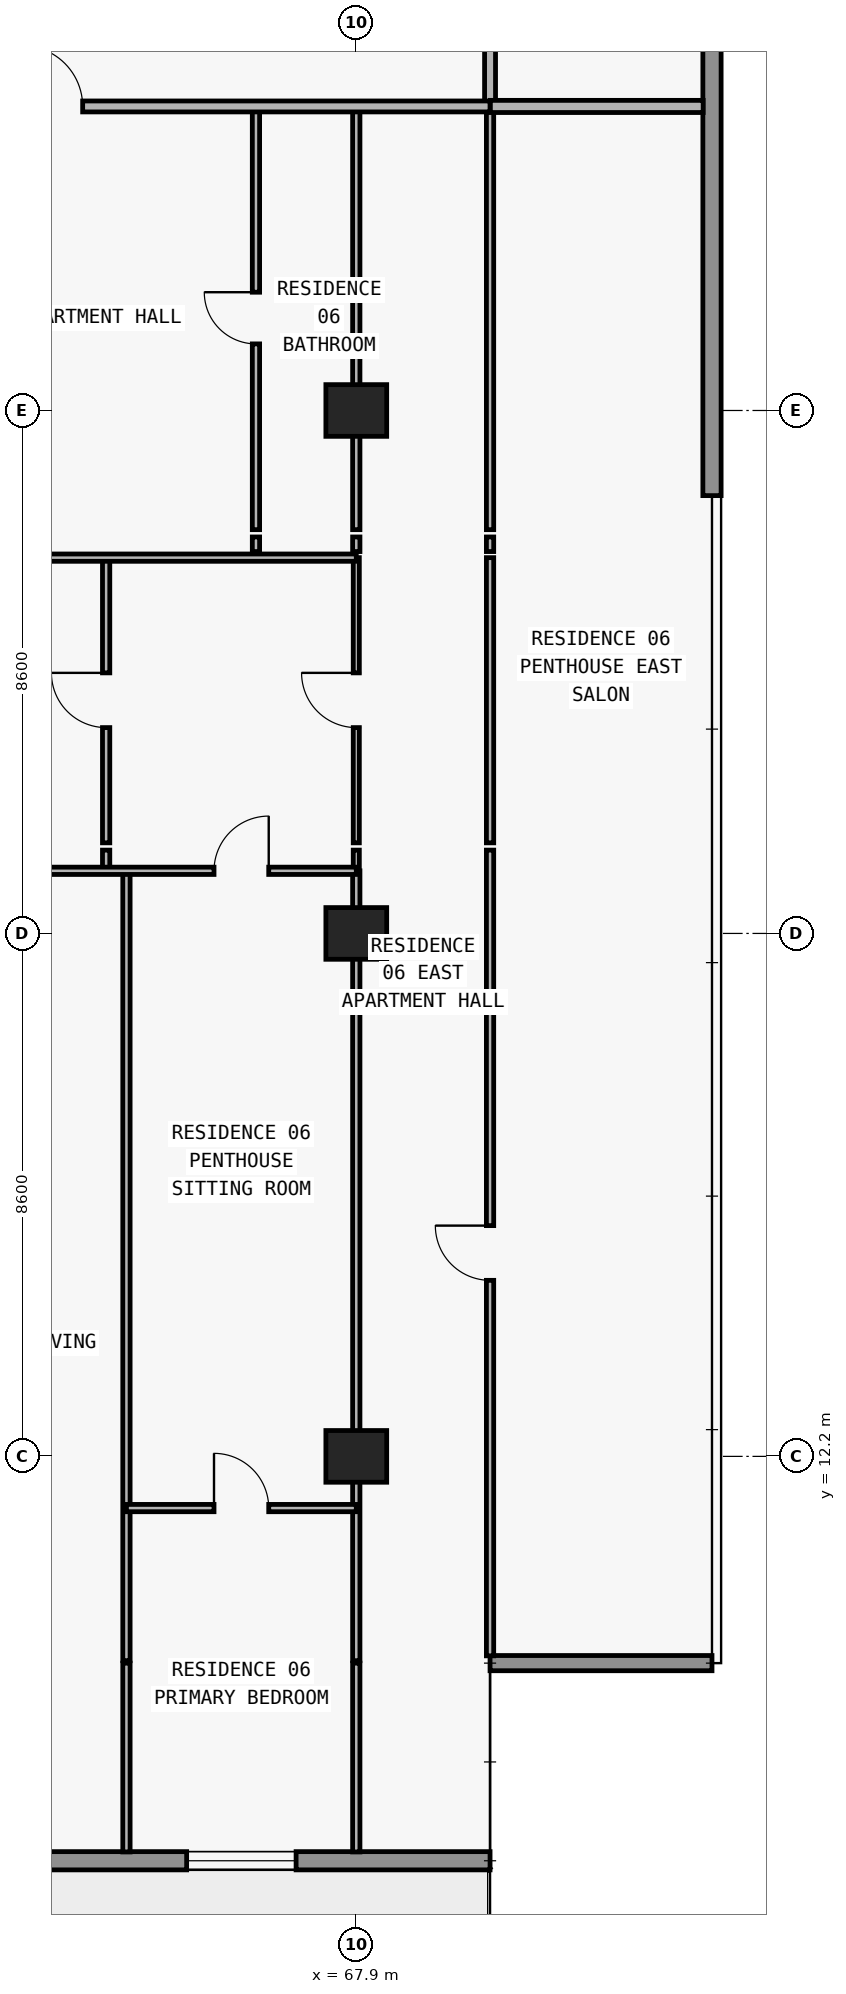
"""IFC4 building model, lengths in metres.
Left out: names, types, materials, properties, quantities, classifications, styles, units other than length and angle.
Written with IfcOpenShell. Run it as: python <this file> out.ifc"""

import sys

from ifc_helpers import new_model, si_unit, direction, frame, frame_2d, origin, origin_2d, place, context, subcontext, project, spatial, rectangle, extrude, element, fill, save


model = new_model("IFC4")
c1 = context("Model", 3, precision=1e-05, world=origin(), true_north=direction((0.0, 1.0)))
c2 = subcontext(c1, "Body", "Model", "MODEL_VIEW")
j1 = project(units=[si_unit("LENGTHUNIT", "METRE"), si_unit("PLANEANGLEUNIT", "RADIAN")], contexts=[c1])
p1 = place(None, origin())
s1 = spatial("IfcSite", under=j1, at=p1, CompositionType="ELEMENT")
p2 = place(p1, origin())
s2 = spatial("IfcBuilding", under=s1, at=p2, CompositionType="ELEMENT")
p3 = place(p2, frame((0.0, 0.0, 87.9)))
s3 = spatial("IfcBuildingStorey", under=s2, at=p3, CompositionType="ELEMENT", Elevation=87.9)
for number, where, z_axis, x_axis in (
    (1, (67.9, 12.2, 0.0), (0.0, 0.0, 1.0), (1.0, 0.0, 0.0)),
    (2, (67.9, 20.8, 0.0), (0.0, 0.0, 1.0), (1.0, 0.0, 0.0)),
    (3, (67.9, 29.4, 0.0), (0.0, 0.0, 1.0), (1.0, 0.0, 0.0)),
):
    element("IfcColumn", number, at=place(p3, frame(where, z_axis=z_axis, x_axis=x_axis)), inside=s3, PredefinedType="COLUMN", context=c2, shape_type="SweptSolid", body=[
        extrude(rectangle(XDim=1.0, YDim=0.85, at=origin_2d()), origin(), (0.0, 0.0, 1.0), 3.05),
    ])
p4 = place(p3, frame((70.1, 5.55, 0.0), z_axis=(0.0, 0.0, 1.0), x_axis=(-1.0, 0.0, 0.0)))
e4 = element("IfcWall", 4, at=p4, inside=s3, PredefinedType="STANDARD", context=c2, shape_type="SweptSolid", body=[
    extrude(rectangle(XDim=62.4, YDim=0.3, at=frame_2d((31.2, 0.0))), origin(), (0.0, 0.0, 1.0), 3.05),
])
p5 = place(p4, frame((57.226, 0.0, 0.0)))
e5 = element("IfcOpeningElement", 5, at=p5, cuts=e4, PredefinedType="OPENING", context=c2, shape_type="SweptSolid", body=[
    extrude(rectangle(XDim=2.0, YDim=2.3, at=frame_2d((1.0, 1.15))), frame((0.0, 0.16, 0.0), z_axis=(0.0, -1.0, 0.0), x_axis=(1.0, 0.0, 0.0)), (0.0, 0.0, 1.0), 0.32),
])
p6 = place(p4, frame((52.926, 0.0, 0.85)))
e6 = element("IfcOpeningElement", 6, at=p6, cuts=e4, PredefinedType="OPENING", context=c2, shape_type="SweptSolid", body=[
    extrude(rectangle(XDim=2.2, YDim=1.55, at=frame_2d((1.1, 0.775))), frame((0.0, 0.16, 0.0), z_axis=(0.0, -1.0, 0.0), x_axis=(1.0, 0.0, 0.0)), (0.0, 0.0, 1.0), 0.32),
])
p7 = place(p4, frame((48.49, 0.0, 0.0)))
e7 = element("IfcOpeningElement", 7, at=p7, cuts=e4, PredefinedType="OPENING", context=c2, shape_type="SweptSolid", body=[
    extrude(rectangle(XDim=2.0, YDim=2.3, at=frame_2d((1.0, 1.15))), frame((0.0, 0.16, 0.0), z_axis=(0.0, -1.0, 0.0), x_axis=(1.0, 0.0, 0.0)), (0.0, 0.0, 1.0), 0.32),
])
p8 = place(p4, frame((44.39, 0.0, 0.85)))
e8 = element("IfcOpeningElement", 8, at=p8, cuts=e4, PredefinedType="OPENING", context=c2, shape_type="SweptSolid", body=[
    extrude(rectangle(XDim=1.8, YDim=1.55, at=frame_2d((0.9, 0.775))), frame((0.0, 0.16, 0.0), z_axis=(0.0, -1.0, 0.0), x_axis=(1.0, 0.0, 0.0)), (0.0, 0.0, 1.0), 0.32),
])
p9 = place(p4, frame((40.426, 0.0, 0.0)))
e9 = element("IfcOpeningElement", 9, at=p9, cuts=e4, PredefinedType="OPENING", context=c2, shape_type="SweptSolid", body=[
    extrude(rectangle(XDim=2.0, YDim=2.3, at=frame_2d((1.0, 1.15))), frame((0.0, 0.16, 0.0), z_axis=(0.0, -1.0, 0.0), x_axis=(1.0, 0.0, 0.0)), (0.0, 0.0, 1.0), 0.32),
])
p10 = place(p4, frame((36.126, 0.0, 0.85)))
e10 = element("IfcOpeningElement", 10, at=p10, cuts=e4, PredefinedType="OPENING", context=c2, shape_type="SweptSolid", body=[
    extrude(rectangle(XDim=2.2, YDim=1.55, at=frame_2d((1.1, 0.775))), frame((0.0, 0.16, 0.0), z_axis=(0.0, -1.0, 0.0), x_axis=(1.0, 0.0, 0.0)), (0.0, 0.0, 1.0), 0.32),
])
p11 = place(p4, frame((32.09, 0.0, 0.0)))
e11 = element("IfcOpeningElement", 11, at=p11, cuts=e4, PredefinedType="OPENING", context=c2, shape_type="SweptSolid", body=[
    extrude(rectangle(XDim=2.0, YDim=2.3, at=frame_2d((1.0, 1.15))), frame((0.0, 0.16, 0.0), z_axis=(0.0, -1.0, 0.0), x_axis=(1.0, 0.0, 0.0)), (0.0, 0.0, 1.0), 0.32),
])
p12 = place(p4, frame((28.21, 0.0, 0.65)))
e12 = element("IfcOpeningElement", 12, at=p12, cuts=e4, PredefinedType="OPENING", context=c2, shape_type="SweptSolid", body=[
    extrude(rectangle(XDim=2.6, YDim=1.85, at=frame_2d((1.3, 0.925))), frame((0.0, 0.16, 0.0), z_axis=(0.0, -1.0, 0.0), x_axis=(1.0, 0.0, 0.0)), (0.0, 0.0, 1.0), 0.32),
])
p13 = place(p4, frame((22.1, 0.0, 0.85)))
e13 = element("IfcOpeningElement", 13, at=p13, cuts=e4, PredefinedType="OPENING", context=c2, shape_type="SweptSolid", body=[
    extrude(rectangle(XDim=2.2, YDim=1.55, at=frame_2d((1.1, 0.775))), frame((0.0, 0.16, 0.0), z_axis=(0.0, -1.0, 0.0), x_axis=(1.0, 0.0, 0.0)), (0.0, 0.0, 1.0), 0.32),
])
p14 = place(p4, frame((16.026, 0.0, 0.0)))
e14 = element("IfcOpeningElement", 14, at=p14, cuts=e4, PredefinedType="OPENING", context=c2, shape_type="SweptSolid", body=[
    extrude(rectangle(XDim=2.0, YDim=2.3, at=frame_2d((1.0, 1.15))), frame((0.0, 0.16, 0.0), z_axis=(0.0, -1.0, 0.0), x_axis=(1.0, 0.0, 0.0)), (0.0, 0.0, 1.0), 0.32),
])
p15 = place(p4, frame((11.726, 0.0, 0.85)))
e15 = element("IfcOpeningElement", 15, at=p15, cuts=e4, PredefinedType="OPENING", context=c2, shape_type="SweptSolid", body=[
    extrude(rectangle(XDim=2.2, YDim=1.55, at=frame_2d((1.1, 0.775))), frame((0.0, 0.16, 0.0), z_axis=(0.0, -1.0, 0.0), x_axis=(1.0, 0.0, 0.0)), (0.0, 0.0, 1.0), 0.32),
])
p16 = place(p4, frame((7.29, 0.0, 0.0)))
e16 = element("IfcOpeningElement", 16, at=p16, cuts=e4, PredefinedType="OPENING", context=c2, shape_type="SweptSolid", body=[
    extrude(rectangle(XDim=2.0, YDim=2.3, at=frame_2d((1.0, 1.15))), frame((0.0, 0.16, 0.0), z_axis=(0.0, -1.0, 0.0), x_axis=(1.0, 0.0, 0.0)), (0.0, 0.0, 1.0), 0.32),
])
p17 = place(p4, frame((3.19, 0.0, 0.85)))
e17 = element("IfcOpeningElement", 17, at=p17, cuts=e4, PredefinedType="OPENING", context=c2, shape_type="SweptSolid", body=[
    extrude(rectangle(XDim=1.8, YDim=1.55, at=frame_2d((0.9, 0.775))), frame((0.0, 0.16, 0.0), z_axis=(0.0, -1.0, 0.0), x_axis=(1.0, 0.0, 0.0)), (0.0, 0.0, 1.0), 0.32),
])
p18 = place(p3, frame((70.1, 8.8, 0.0), z_axis=(0.0, 0.0, 1.0), x_axis=(1.0, 0.0, 0.0)))
e18 = element("IfcWall", 18, at=p18, inside=s3, PredefinedType="ELEMENTEDWALL", context=c2, shape_type="SweptSolid", body=[
    extrude(rectangle(XDim=3.65, YDim=0.25, at=frame_2d((1.825, 0.0))), origin(), (0.0, 0.0, 1.0), 3.05),
])
p19 = place(p3, frame((73.75, 47.2, 0.0), z_axis=(0.0, 0.0, 1.0), x_axis=(0.0, -1.0, 0.0)))
e19 = element("IfcWall", 19, at=p19, inside=s3, PredefinedType="STANDARD", context=c2, shape_type="SweptSolid", body=[
    extrude(rectangle(XDim=19.2, YDim=0.3, at=frame_2d((9.6, 0.0))), origin(), (0.0, 0.0, 1.0), 3.05),
])
p20 = place(p3, frame((63.786, 21.83, 0.0), z_axis=(0.0, 0.0, 1.0), x_axis=(0.0, 1.0, 0.0)))
e20 = element("IfcWall", 20, at=p20, inside=s3, PredefinedType="PARTITIONING", context=c2, shape_type="SweptSolid", body=[
    extrude(rectangle(XDim=0.34, YDim=0.12, at=frame_2d((0.17, 0.0))), origin(), (0.0, 0.0, 1.0), 3.05),
])
p21 = place(p3, frame((63.786, 22.29, 0.0), z_axis=(0.0, 0.0, 1.0), x_axis=(0.0, 1.0, 0.0)))
e21 = element("IfcWall", 21, at=p21, inside=s3, PredefinedType="PARTITIONING", context=c2, shape_type="SweptSolid", body=[
    extrude(rectangle(XDim=4.69, YDim=0.12, at=frame_2d((2.345, 0.0))), origin(), (0.0, 0.0, 1.0), 3.05),
])
p22 = place(p21, frame((1.895, 0.0, 0.0)))
e22 = element("IfcOpeningElement", 22, at=p22, cuts=e21, PredefinedType="OPENING", context=c2, shape_type="SweptSolid", body=[
    extrude(rectangle(XDim=0.9, YDim=2.15, at=frame_2d((0.45, 1.075))), frame((0.0, 0.07, 0.0), z_axis=(0.0, -1.0, 0.0), x_axis=(1.0, 0.0, 0.0)), (0.0, 0.0, 1.0), 0.14),
])
p23 = place(p3, frame((64.12, 5.695, 0.0), z_axis=(0.0, 0.0, 1.0), x_axis=(0.0, 1.0, 0.0)))
e23 = element("IfcWall", 23, at=p23, inside=s3, PredefinedType="PARTITIONING", context=c2, shape_type="SweptSolid", body=[
    extrude(rectangle(XDim=3.105, YDim=0.12, at=frame_2d((1.552, 0.0))), origin(), (0.0, 0.0, 1.0), 3.05),
])
p24 = place(p3, frame((64.12, 8.84, 0.0), z_axis=(0.0, 0.0, 1.0), x_axis=(0.0, 1.0, 0.0)))
e24 = element("IfcWall", 24, at=p24, inside=s3, PredefinedType="PARTITIONING", context=c2, shape_type="SweptSolid", body=[
    extrude(rectangle(XDim=12.99, YDim=0.12, at=frame_2d((6.495, 0.0))), origin(), (0.0, 0.0, 1.0), 3.05),
])
p25 = place(p3, frame((66.25, 27.08, 0.0), z_axis=(0.0, 0.0, 1.0), x_axis=(0.0, 1.0, 0.0)))
e25 = element("IfcWall", 25, at=p25, inside=s3, PredefinedType="PARTITIONING", context=c2, shape_type="SweptSolid", body=[
    extrude(rectangle(XDim=0.24, YDim=0.12, at=frame_2d((0.12, 0.0))), origin(), (0.0, 0.0, 1.0), 3.05),
])
p26 = place(p3, frame((66.25, 27.44, 0.0), z_axis=(0.0, 0.0, 1.0), x_axis=(0.0, 1.0, 0.0)))
e26 = element("IfcWall", 26, at=p26, inside=s3, PredefinedType="PARTITIONING", context=c2, shape_type="SweptSolid", body=[
    extrude(rectangle(XDim=6.96, YDim=0.12, at=frame_2d((3.48, 0.0))), origin(), (0.0, 0.0, 1.0), 3.05),
])
p27 = place(p26, frame((3.055, 0.0, 0.0)))
e27 = element("IfcOpeningElement", 27, at=p27, cuts=e26, PredefinedType="OPENING", context=c2, shape_type="SweptSolid", body=[
    extrude(rectangle(XDim=0.85, YDim=2.1, at=frame_2d((0.425, 1.05))), frame((0.0, 0.07, 0.0), z_axis=(0.0, -1.0, 0.0), x_axis=(1.0, 0.0, 0.0)), (0.0, 0.0, 1.0), 0.14),
])
p28 = place(p3, frame((67.9, 5.695, 0.0), z_axis=(0.0, 0.0, 1.0), x_axis=(0.0, 1.0, 0.0)))
e28 = element("IfcWall", 28, at=p28, inside=s3, PredefinedType="PARTITIONING", context=c2, shape_type="SweptSolid", body=[
    extrude(rectangle(XDim=3.105, YDim=0.12, at=frame_2d((1.552, 0.0))), origin(), (0.0, 0.0, 1.0), 3.05),
])
p29 = place(p3, frame((67.9, 8.84, 0.0), z_axis=(0.0, 0.0, 1.0), x_axis=(0.0, 1.0, 0.0)))
e29 = element("IfcWall", 29, at=p29, inside=s3, PredefinedType="PARTITIONING", context=c2, shape_type="SweptSolid", body=[
    extrude(rectangle(XDim=12.99, YDim=0.12, at=frame_2d((6.495, 0.0))), origin(), (0.0, 0.0, 1.0), 2.174),
])
p30 = place(p3, frame((67.9, 21.835, 0.0), z_axis=(0.0, 0.0, 1.0), x_axis=(0.0, 1.0, 0.0)))
e30 = element("IfcWall", 30, at=p30, inside=s3, PredefinedType="MOVABLE", context=c2, shape_type="SweptSolid", body=[
    extrude(rectangle(XDim=0.335, YDim=0.1, at=frame_2d((0.167, 0.0))), origin(), (0.0, 0.0, 1.0), 2.174),
])
p31 = place(p3, frame((67.9, 22.29, 0.0), z_axis=(0.0, 0.0, 1.0), x_axis=(0.0, 1.0, 0.0)))
e31 = element("IfcWall", 31, at=p31, inside=s3, PredefinedType="MOVABLE", context=c2, shape_type="SweptSolid", body=[
    extrude(rectangle(XDim=4.69, YDim=0.1, at=frame_2d((2.345, 0.0))), origin(), (0.0, 0.0, 1.0), 2.174),
])
p32 = place(p31, frame((1.895, 0.0, 0.0)))
e32 = element("IfcOpeningElement", 32, at=p32, cuts=e31, PredefinedType="OPENING", context=c2, shape_type="SweptSolid", body=[
    extrude(rectangle(XDim=0.9, YDim=2.124, at=frame_2d((0.45, 1.062))), frame((0.0, 0.06, 0.0), z_axis=(0.0, -1.0, 0.0), x_axis=(1.0, 0.0, 0.0)), (0.0, 0.0, 1.0), 0.12),
])
p33 = place(p3, frame((67.9, 27.08, 0.0), z_axis=(0.0, 0.0, 1.0), x_axis=(0.0, 1.0, 0.0)))
e33 = element("IfcWall", 33, at=p33, inside=s3, PredefinedType="PARTITIONING", context=c2, shape_type="SweptSolid", body=[
    extrude(rectangle(XDim=0.24, YDim=0.12, at=frame_2d((0.12, 0.0))), origin(), (0.0, 0.0, 1.0), 2.174),
])
p34 = place(p3, frame((67.9, 27.44, 0.0), z_axis=(0.0, 0.0, 1.0), x_axis=(0.0, 1.0, 0.0)))
e34 = element("IfcWall", 34, at=p34, inside=s3, PredefinedType="PARTITIONING", context=c2, shape_type="SweptSolid", body=[
    extrude(rectangle(XDim=6.96, YDim=0.12, at=frame_2d((3.48, 0.0))), origin(), (0.0, 0.0, 1.0), 2.174),
])
p35 = place(p3, frame((70.1, 8.92, 0.0), z_axis=(0.0, 0.0, 1.0), x_axis=(0.0, 1.0, 0.0)))
e35 = element("IfcWall", 35, at=p35, inside=s3, PredefinedType="PARTITIONING", context=c2, shape_type="SweptSolid", body=[
    extrude(rectangle(XDim=13.25, YDim=0.12, at=frame_2d((6.625, 0.0))), origin(), (0.0, 0.0, 1.0), 3.05),
])
p36 = place(p35, frame((6.175, 0.0, 0.0)))
e36 = element("IfcOpeningElement", 36, at=p36, cuts=e35, PredefinedType="OPENING", context=c2, shape_type="SweptSolid", body=[
    extrude(rectangle(XDim=0.9, YDim=2.15, at=frame_2d((0.45, 1.075))), frame((0.0, 0.07, 0.0), z_axis=(0.0, -1.0, 0.0), x_axis=(1.0, 0.0, 0.0)), (0.0, 0.0, 1.0), 0.14),
])
p37 = place(p3, frame((70.1, 22.29, 0.0), z_axis=(0.0, 0.0, 1.0), x_axis=(0.0, 1.0, 0.0)))
e37 = element("IfcWall", 37, at=p37, inside=s3, PredefinedType="PARTITIONING", context=c2, shape_type="SweptSolid", body=[
    extrude(rectangle(XDim=4.69, YDim=0.12, at=frame_2d((2.345, 0.0))), origin(), (0.0, 0.0, 1.0), 3.05),
])
p38 = place(p3, frame((70.1, 27.08, 0.0), z_axis=(0.0, 0.0, 1.0), x_axis=(0.0, 1.0, 0.0)))
e38 = element("IfcWall", 38, at=p38, inside=s3, PredefinedType="PARTITIONING", context=c2, shape_type="SweptSolid", body=[
    extrude(rectangle(XDim=0.24, YDim=0.12, at=frame_2d((0.12, 0.0))), origin(), (0.0, 0.0, 1.0), 3.05),
])
p39 = place(p3, frame((70.1, 27.44, 0.0), z_axis=(0.0, 0.0, 1.0), x_axis=(0.0, 1.0, 0.0)))
e39 = element("IfcWall", 39, at=p39, inside=s3, PredefinedType="PARTITIONING", context=c2, shape_type="SweptSolid", body=[
    extrude(rectangle(XDim=6.96, YDim=0.12, at=frame_2d((3.48, 0.0))), origin(), (0.0, 0.0, 1.0), 3.05),
])
p40 = place(p3, frame((70.1, 34.405, 0.0), z_axis=(0.0, 0.0, 1.0), x_axis=(0.0, 1.0, 0.0)))
e40 = element("IfcWall", 40, at=p40, inside=s3, PredefinedType="PARTITIONING", context=c2, shape_type="SweptSolid", body=[
    extrude(rectangle(XDim=2.545, YDim=0.18, at=frame_2d((1.272, 0.0))), origin(), (0.0, 0.0, 1.0), 3.05),
])
p41 = place(p3, frame((64.12, 11.35, 0.0), z_axis=(0.0, 0.0, 1.0), x_axis=(1.0, 0.0, 0.0)))
e41 = element("IfcWall", 41, at=p41, inside=s3, PredefinedType="PARTITIONING", context=c2, shape_type="SweptSolid", body=[
    extrude(rectangle(XDim=3.78, YDim=0.12, at=frame_2d((1.89, 0.0))), origin(), (0.0, 0.0, 1.0), 3.05),
])
p42 = place(p41, frame((1.44, 0.0, 0.0)))
e42 = element("IfcOpeningElement", 42, at=p42, cuts=e41, PredefinedType="OPENING", context=c2, shape_type="SweptSolid", body=[
    extrude(rectangle(XDim=0.9, YDim=2.15, at=frame_2d((0.45, 1.075))), frame((0.0, 0.07, 0.0), z_axis=(0.0, -1.0, 0.0), x_axis=(1.0, 0.0, 0.0)), (0.0, 0.0, 1.0), 0.14),
])
p43 = place(p3, frame((59.55, 21.83, 0.0), z_axis=(0.0, 0.0, 1.0), x_axis=(1.0, 0.0, 0.0)))
e43 = element("IfcWall", 43, at=p43, inside=s3, PredefinedType="PARTITIONING", context=c2, shape_type="SweptSolid", body=[
    extrude(rectangle(XDim=8.35, YDim=0.12, at=frame_2d((4.175, 0.0))), origin(), (0.0, 0.0, 1.0), 3.05),
])
p44 = place(p43, frame((1.668, 0.0, 0.0)))
e44 = element("IfcOpeningElement", 44, at=p44, cuts=e43, PredefinedType="OPENING", context=c2, shape_type="SweptSolid", body=[
    extrude(rectangle(XDim=0.9, YDim=2.15, at=frame_2d((0.45, 1.075))), frame((0.0, 0.07, 0.0), z_axis=(0.0, -1.0, 0.0), x_axis=(1.0, 0.0, 0.0)), (0.0, 0.0, 1.0), 0.14),
])
p45 = place(p43, frame((6.01, 0.0, 0.0)))
e45 = element("IfcOpeningElement", 45, at=p45, cuts=e43, PredefinedType="OPENING", context=c2, shape_type="SweptSolid", body=[
    extrude(rectangle(XDim=0.9, YDim=2.15, at=frame_2d((0.45, 1.075))), frame((0.0, 0.07, 0.0), z_axis=(0.0, -1.0, 0.0), x_axis=(1.0, 0.0, 0.0)), (0.0, 0.0, 1.0), 0.14),
])
p46 = place(p3, frame((59.55, 26.98, 0.0), z_axis=(0.0, 0.0, 1.0), x_axis=(1.0, 0.0, 0.0)))
e46 = element("IfcWall", 46, at=p46, inside=s3, PredefinedType="PARTITIONING", context=c2, shape_type="SweptSolid", body=[
    extrude(rectangle(XDim=8.35, YDim=0.12, at=frame_2d((4.175, 0.0))), origin(), (0.0, 0.0, 1.0), 3.05),
])
p47 = place(p46, frame((1.668, 0.0, 0.0)))
e47 = element("IfcOpeningElement", 47, at=p47, cuts=e46, PredefinedType="OPENING", context=c2, shape_type="SweptSolid", body=[
    extrude(rectangle(XDim=0.9, YDim=2.15, at=frame_2d((0.45, 1.075))), frame((0.0, 0.07, 0.0), z_axis=(0.0, -1.0, 0.0), x_axis=(1.0, 0.0, 0.0)), (0.0, 0.0, 1.0), 0.14),
])
p48 = place(p3, frame((59.55, 34.4, 0.0), z_axis=(0.0, 0.0, 1.0), x_axis=(1.0, 0.0, 0.0)))
e48 = element("IfcWall", 48, at=p48, inside=s3, PredefinedType="PARTITIONING", context=c2, shape_type="SweptSolid", body=[
    extrude(rectangle(XDim=10.55, YDim=0.18, at=frame_2d((5.275, 0.0))), origin(), (0.0, 0.0, 1.0), 3.05),
])
p49 = place(p48, frame((2.85, 0.0, 0.0)))
e49 = element("IfcOpeningElement", 49, at=p49, cuts=e48, PredefinedType="OPENING", context=c2, shape_type="SweptSolid", body=[
    extrude(rectangle(XDim=1.0, YDim=2.2, at=frame_2d((0.5, 1.1))), frame((0.0, 0.1, 0.0), z_axis=(0.0, -1.0, 0.0), x_axis=(1.0, 0.0, 0.0)), (0.0, 0.0, 1.0), 0.2),
])
p50 = place(p3, frame((70.105, 34.4, 0.0), z_axis=(0.0, 0.0, 1.0), x_axis=(1.0, 0.0, 0.0)))
e50 = element("IfcWall", 50, at=p50, inside=s3, PredefinedType="PARTITIONING", context=c2, shape_type="SweptSolid", body=[
    extrude(rectangle(XDim=3.5, YDim=0.2, at=frame_2d((1.75, 0.0))), origin(), (0.0, 0.0, 1.0), 3.05),
])
p51 = place(p17, origin())
e51 = element("IfcWindow", 51, at=p51, inside=s3, PartitioningType="SINGLE_PANEL", PredefinedType="WINDOW", context=c2, shape_type="SweptSolid", body=[
    extrude(rectangle(XDim=1.8, YDim=1.55, at=frame_2d((0.9, 0.775))), frame((0.0, 0.03, 0.0), z_axis=(0.0, -1.0, 0.0), x_axis=(1.0, 0.0, 0.0)), (0.0, 0.0, 1.0), 0.06),
])
fill(e17, e51)
p52 = place(p49, origin())
e52 = element("IfcDoor", 52, at=p52, inside=s3, OperationType="SINGLE_SWING_LEFT", PredefinedType="DOOR", context=c2, shape_type="SweptSolid", body=[
    extrude(rectangle(XDim=1.0, YDim=2.2, at=frame_2d((0.5, 1.1))), frame((0.0, 0.025, 0.0), z_axis=(0.0, -1.0, 0.0), x_axis=(1.0, 0.0, 0.0)), (0.0, 0.0, 1.0), 0.05),
])
fill(e49, e52)
p53 = place(p27, origin())
e53 = element("IfcDoor", 53, at=p53, inside=s3, OperationType="SINGLE_SWING_RIGHT", PredefinedType="DOOR", context=c2, shape_type="SweptSolid", body=[
    extrude(rectangle(XDim=0.85, YDim=2.1, at=frame_2d((0.425, 1.05))), frame((0.0, 0.025, 0.0), z_axis=(0.0, -1.0, 0.0), x_axis=(1.0, 0.0, 0.0)), (0.0, 0.0, 1.0), 0.05),
])
fill(e27, e53)
p54 = place(p22, origin())
e54 = element("IfcDoor", 54, at=p54, inside=s3, OperationType="SINGLE_SWING_RIGHT", PredefinedType="DOOR", context=c2, shape_type="SweptSolid", body=[
    extrude(rectangle(XDim=0.9, YDim=2.15, at=frame_2d((0.45, 1.075))), frame((0.0, 0.025, 0.0), z_axis=(0.0, -1.0, 0.0), x_axis=(1.0, 0.0, 0.0)), (0.0, 0.0, 1.0), 0.05),
])
fill(e22, e54)
p55 = place(p45, origin())
e55 = element("IfcDoor", 55, at=p55, inside=s3, OperationType="SINGLE_SWING_RIGHT", PredefinedType="DOOR", context=c2, shape_type="SweptSolid", body=[
    extrude(rectangle(XDim=0.9, YDim=2.15, at=frame_2d((0.45, 1.075))), frame((0.0, 0.025, 0.0), z_axis=(0.0, -1.0, 0.0), x_axis=(1.0, 0.0, 0.0)), (0.0, 0.0, 1.0), 0.05),
])
fill(e45, e55)
p56 = place(p42, origin())
e56 = element("IfcDoor", 56, at=p56, inside=s3, OperationType="SINGLE_SWING_LEFT", PredefinedType="DOOR", context=c2, shape_type="SweptSolid", body=[
    extrude(rectangle(XDim=0.9, YDim=2.15, at=frame_2d((0.45, 1.075))), frame((0.0, 0.025, 0.0), z_axis=(0.0, -1.0, 0.0), x_axis=(1.0, 0.0, 0.0)), (0.0, 0.0, 1.0), 0.05),
])
fill(e42, e56)
p57 = place(p32, origin())
e57 = element("IfcDoor", 57, at=p57, inside=s3, OperationType="SINGLE_SWING_RIGHT", PredefinedType="DOOR", context=c2, shape_type="SweptSolid", body=[
    extrude(rectangle(XDim=0.9, YDim=2.124, at=frame_2d((0.45, 1.062))), frame((0.0, 0.025, 0.0), z_axis=(0.0, -1.0, 0.0), x_axis=(1.0, 0.0, 0.0)), (0.0, 0.0, 1.0), 0.05),
])
fill(e32, e57)
p58 = place(p36, origin())
e58 = element("IfcDoor", 58, at=p58, inside=s3, OperationType="SINGLE_SWING_RIGHT", PredefinedType="DOOR", context=c2, shape_type="SweptSolid", body=[
    extrude(rectangle(XDim=0.9, YDim=2.15, at=frame_2d((0.45, 1.075))), frame((0.0, 0.025, 0.0), z_axis=(0.0, -1.0, 0.0), x_axis=(1.0, 0.0, 0.0)), (0.0, 0.0, 1.0), 0.05),
])
fill(e36, e58)
save(model, sys.argv[1])
